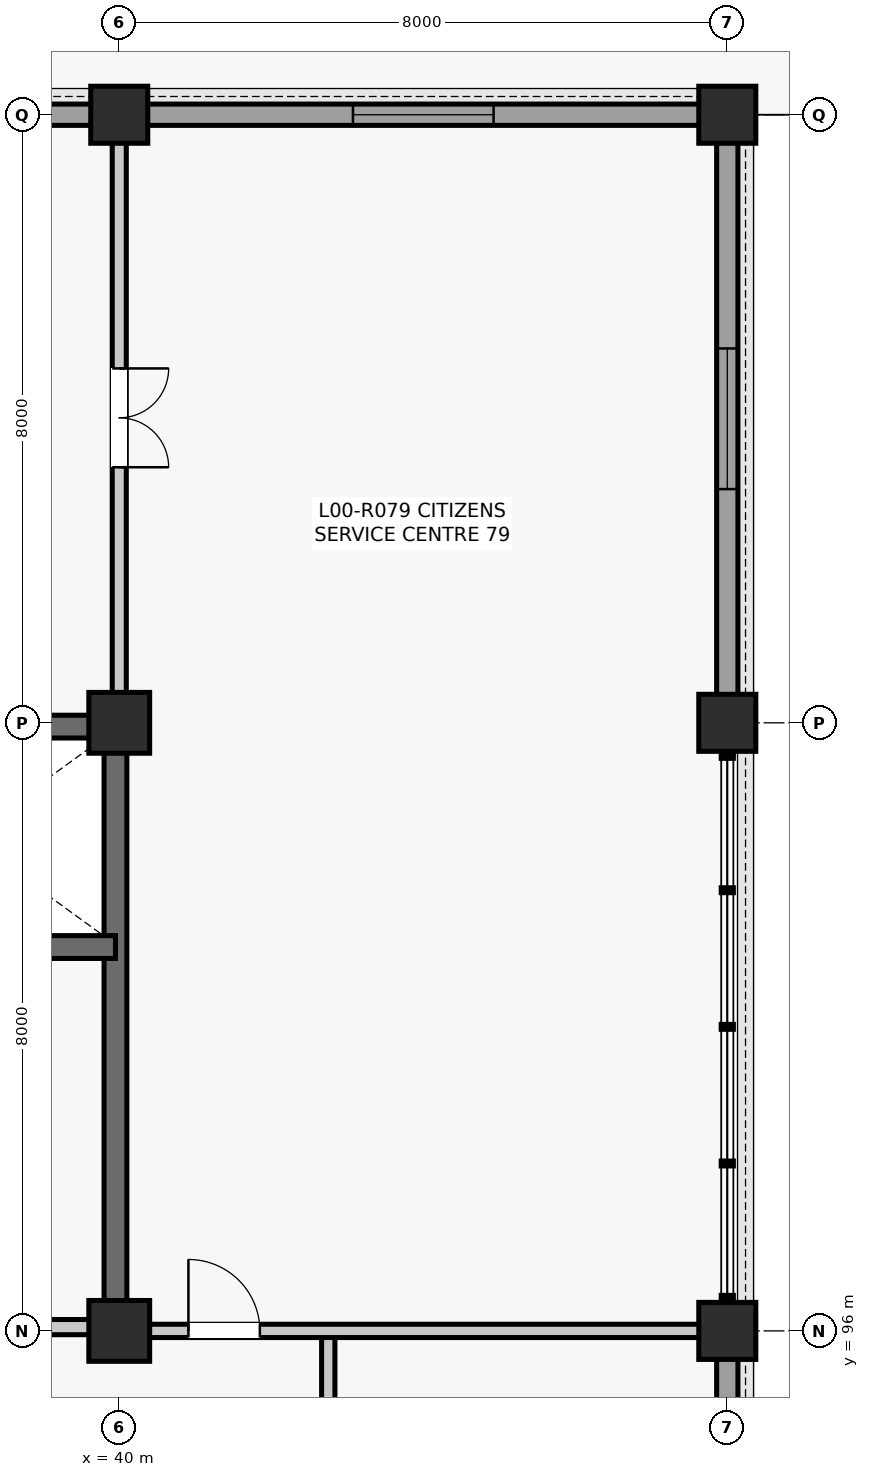
"""IFC4 building model, lengths in metres.
Left out: names, types, materials, properties, quantities, classifications, styles, units other than length and angle.
Written with IfcOpenShell. Run it as: python <this file> out.ifc"""

import sys

from ifc_helpers import new_model, si_unit, direction, frame, frame_2d, origin, origin_2d, place, context, subcontext, project, spatial, rectangle, extrude, element, fill, save


model = new_model("IFC4")
c1 = context("Model", 3, precision=1e-05, world=origin(), true_north=direction((0.0, 1.0)))
c2 = subcontext(c1, "Body", "Model", "MODEL_VIEW")
j1 = project(units=[si_unit("LENGTHUNIT", "METRE"), si_unit("PLANEANGLEUNIT", "RADIAN")], contexts=[c1])
p1 = place(None, origin())
s1 = spatial("IfcSite", under=j1, at=p1, CompositionType="ELEMENT")
p2 = place(p1, origin())
s2 = spatial("IfcBuilding", under=s1, at=p2, CompositionType="ELEMENT")
p3 = place(p2, origin())
s3 = spatial("IfcBuildingStorey", under=s2, at=p3, CompositionType="ELEMENT", Elevation=0.0)
for number, where, z_axis, x_axis in (
    (1, (40.0, 96.0, 0.0), (0.0, 0.0, 1.0), (1.0, 0.0, 0.0)),
    (2, (40.0, 104.0, 0.0), (0.0, 0.0, 1.0), (1.0, 0.0, 0.0)),
):
    element("IfcColumn", number, at=place(p3, frame(where, z_axis=z_axis, x_axis=x_axis)), inside=s3, PredefinedType="COLUMN", context=c2, shape_type="SweptSolid", body=[
        extrude(rectangle(XDim=0.8, YDim=0.8, at=origin_2d()), origin(), (0.0, 0.0, 1.0), 5.28),
    ])
for number, where, z_axis, x_axis in (
    (3, (40.0, 112.0, 0.0), (0.0, 0.0, 1.0), (1.0, 0.0, 0.0)),
    (4, (48.0, 96.0, 0.0), (0.0, 0.0, 1.0), (1.0, 0.0, 0.0)),
    (5, (48.0, 104.0, 0.0), (0.0, 0.0, 1.0), (1.0, 0.0, 0.0)),
    (6, (48.0, 112.0, 0.0), (0.0, 0.0, 1.0), (1.0, 0.0, 0.0)),
):
    element("IfcColumn", number, at=place(p3, frame(where, z_axis=z_axis, x_axis=x_axis)), inside=s3, PredefinedType="COLUMN", context=c2, shape_type="SweptSolid", body=[
        extrude(rectangle(XDim=0.75, YDim=0.75, at=origin_2d()), origin(), (0.0, 0.0, 1.0), 5.28),
    ])
p4 = place(p3, frame((32.36, 112.0, 0.0), z_axis=(0.0, 0.0, 1.0), x_axis=(1.0, 0.0, 0.0)))
e7 = element("IfcWall", 7, at=p4, inside=s3, PredefinedType="SOLIDWALL", context=c2, shape_type="SweptSolid", body=[
    extrude(rectangle(XDim=7.28, YDim=0.28, at=frame_2d((3.64, 0.0))), origin(), (0.0, 0.0, 1.0), 4.614),
])
p5 = place(p4, frame((2.54, 0.0, 0.0)))
e8 = element("IfcOpeningElement", 8, at=p5, cuts=e7, PredefinedType="OPENING", context=c2, shape_type="SweptSolid", body=[
    extrude(rectangle(XDim=2.2, YDim=2.5, at=frame_2d((1.1, 1.25))), frame((0.0, 0.15, 0.0), z_axis=(0.0, -1.0, 0.0), x_axis=(1.0, 0.0, 0.0)), (0.0, 0.0, 1.0), 0.3),
])
p6 = place(p3, frame((48.0, 88.36, 0.0), z_axis=(0.0, 0.0, 1.0), x_axis=(0.0, 1.0, 0.0)))
e9 = element("IfcWall", 9, at=p6, inside=s3, PredefinedType="SOLIDWALL", context=c2, shape_type="SweptSolid", body=[
    extrude(rectangle(XDim=7.28, YDim=0.28, at=frame_2d((3.64, 0.0))), origin(), (0.0, 0.0, 1.0), 4.674),
])
p7 = place(p6, frame((0.71, 0.0, 0.95)))
e10 = element("IfcOpeningElement", 10, at=p7, cuts=e9, PredefinedType="OPENING", context=c2, shape_type="SweptSolid", body=[
    extrude(rectangle(XDim=1.2, YDim=1.8, at=frame_2d((0.6, 0.9))), frame((0.0, 0.15, 0.0), z_axis=(0.0, -1.0, 0.0), x_axis=(1.0, 0.0, 0.0)), (0.0, 0.0, 1.0), 0.3),
])
p8 = place(p6, frame((5.37, 0.0, 0.95)))
e11 = element("IfcOpeningElement", 11, at=p8, cuts=e9, PredefinedType="OPENING", context=c2, shape_type="SweptSolid", body=[
    extrude(rectangle(XDim=1.2, YDim=1.8, at=frame_2d((0.6, 0.9))), frame((0.0, 0.15, 0.0), z_axis=(0.0, -1.0, 0.0), x_axis=(1.0, 0.0, 0.0)), (0.0, 0.0, 1.0), 0.3),
])
p9 = place(p3, frame((40.36, 112.0, 0.0), z_axis=(0.0, 0.0, 1.0), x_axis=(1.0, 0.0, 0.0)))
e12 = element("IfcWall", 12, at=p9, inside=s3, PredefinedType="SOLIDWALL", context=c2, shape_type="SweptSolid", body=[
    extrude(rectangle(XDim=7.28, YDim=0.28, at=frame_2d((3.64, 0.0))), origin(), (0.0, 0.0, 1.0), 4.677),
])
p10 = place(p9, frame((2.715, 0.0, 0.9)))
e13 = element("IfcOpeningElement", 13, at=p10, cuts=e12, PredefinedType="OPENING", context=c2, shape_type="SweptSolid", body=[
    extrude(rectangle(XDim=1.85, YDim=2.65, at=frame_2d((0.925, 1.325))), frame((0.0, 0.15, 0.0), z_axis=(0.0, -1.0, 0.0), x_axis=(1.0, 0.0, 0.0)), (0.0, 0.0, 1.0), 0.3),
])
p11 = place(p3, frame((48.0, 104.36, 0.0), z_axis=(0.0, 0.0, 1.0), x_axis=(0.0, 1.0, 0.0)))
e14 = element("IfcWall", 14, at=p11, inside=s3, PredefinedType="SOLIDWALL", context=c2, shape_type="SweptSolid", body=[
    extrude(rectangle(XDim=7.28, YDim=0.28, at=frame_2d((3.64, 0.0))), origin(), (0.0, 0.0, 1.0), 4.677),
])
p12 = place(p11, frame((2.715, 0.0, 0.9)))
e15 = element("IfcOpeningElement", 15, at=p12, cuts=e14, PredefinedType="OPENING", context=c2, shape_type="SweptSolid", body=[
    extrude(rectangle(XDim=1.85, YDim=2.65, at=frame_2d((0.925, 1.325))), frame((0.0, 0.15, 0.0), z_axis=(0.0, -1.0, 0.0), x_axis=(1.0, 0.0, 0.0)), (0.0, 0.0, 1.0), 0.3),
])
for number, where, z_axis, x_axis in (
    (16, (32.29, 103.95, 0.0), (0.0, 0.0, 1.0), (1.0, 0.0, 0.0)),
    (17, (39.95, 96.29, 0.0), (0.0, 0.0, 1.0), (0.0, 1.0, 0.0)),
):
    element("IfcWall", number, at=place(p3, frame(where, z_axis=z_axis, x_axis=x_axis)), inside=s3, PredefinedType="SHEAR", context=c2, shape_type="SweptSolid", body=[
        extrude(rectangle(XDim=7.42, YDim=0.3, at=frame_2d((3.71, 0.0))), origin(), (0.0, 0.0, 1.0), 5.035),
    ])
p13 = place(p3, frame((36.0, 101.05, 0.0), z_axis=(0.0, 0.0, 1.0), x_axis=(1.0, 0.0, 0.0)))
e18 = element("IfcWall", 18, at=p13, inside=s3, PredefinedType="SHEAR", context=c2, shape_type="SweptSolid", body=[
    extrude(rectangle(XDim=3.95, YDim=0.3, at=frame_2d((1.975, 0.0))), origin(), (0.0, 0.0, 1.0), 5.035),
])
p14 = place(p13, frame((1.425, 0.0, 0.0)))
e19 = element("IfcOpeningElement", 19, at=p14, cuts=e18, PredefinedType="OPENING", context=c2, shape_type="SweptSolid", body=[
    extrude(rectangle(XDim=1.1, YDim=2.2, at=frame_2d((0.55, 1.1))), frame((0.0, 0.16, 0.0), z_axis=(0.0, -1.0, 0.0), x_axis=(1.0, 0.0, 0.0)), (0.0, 0.0, 1.0), 0.32),
])
p15 = place(p3, frame((36.0, 96.05, 0.0), z_axis=(0.0, 0.0, 1.0), x_axis=(1.0, 0.0, 0.0)))
e20 = element("IfcWall", 20, at=p15, inside=s3, PredefinedType="PARTITIONING", context=c2, shape_type="SweptSolid", body=[
    extrude(rectangle(XDim=3.61, YDim=0.2, at=frame_2d((1.805, 0.0))), origin(), (0.0, 0.0, 1.0), 4.327),
])
p16 = place(p15, frame((1.205, 0.0, 0.0)))
e21 = element("IfcOpeningElement", 21, at=p16, cuts=e20, PredefinedType="OPENING", context=c2, shape_type="SweptSolid", body=[
    extrude(rectangle(XDim=1.2, YDim=2.15, at=frame_2d((0.6, 1.075))), frame((0.0, 0.11, 0.0), z_axis=(0.0, -1.0, 0.0), x_axis=(1.0, 0.0, 0.0)), (0.0, 0.0, 1.0), 0.22),
])
p17 = place(p3, frame((42.75, 90.7, 0.0), z_axis=(0.0, 0.0, 1.0), x_axis=(0.0, 1.0, 0.0)))
e22 = element("IfcWall", 22, at=p17, inside=s3, PredefinedType="PARTITIONING", context=c2, shape_type="SweptSolid", body=[
    extrude(rectangle(XDim=5.28, YDim=0.175, at=frame_2d((2.64, 0.0))), origin(), (0.0, 0.0, 1.0), 4.403),
])
p18 = place(p3, frame((40.0, 104.39, 0.0), z_axis=(0.0, 0.0, 1.0), x_axis=(0.0, 1.0, 0.0)))
e23 = element("IfcWall", 23, at=p18, inside=s3, PredefinedType="PARTITIONING", context=c2, shape_type="SweptSolid", body=[
    extrude(rectangle(XDim=7.245, YDim=0.185, at=frame_2d((3.623, 0.0))), origin(), (0.0, 0.0, 1.0), 4.404),
])
p19 = place(p18, frame((2.972, 0.0, 0.0)))
e24 = element("IfcOpeningElement", 24, at=p19, cuts=e23, PredefinedType="OPENING", context=c2, shape_type="SweptSolid", body=[
    extrude(rectangle(XDim=1.3, YDim=2.2, at=frame_2d((0.65, 1.1))), frame((0.0, 0.103, 0.0), z_axis=(0.0, -1.0, 0.0), x_axis=(1.0, 0.0, 0.0)), (0.0, 0.0, 1.0), 0.205),
])
p20 = place(p3, frame((40.39, 96.0, 0.0), z_axis=(0.0, 0.0, 1.0), x_axis=(1.0, 0.0, 0.0)))
e25 = element("IfcWall", 25, at=p20, inside=s3, PredefinedType="PARTITIONING", context=c2, shape_type="SweptSolid", body=[
    extrude(rectangle(XDim=7.245, YDim=0.175, at=frame_2d((3.623, 0.0))), origin(), (0.0, 0.0, 1.0), 4.403),
])
p21 = place(p20, frame((0.52, 0.0, 0.0)))
e26 = element("IfcOpeningElement", 26, at=p21, cuts=e25, PredefinedType="OPENING", context=c2, shape_type="SweptSolid", body=[
    extrude(rectangle(XDim=0.94, YDim=2.12, at=frame_2d((0.47, 1.06))), frame((0.0, 0.097, 0.0), z_axis=(0.0, -1.0, 0.0), x_axis=(1.0, 0.0, 0.0)), (0.0, 0.0, 1.0), 0.195),
])
p22 = place(p10, origin())
e27 = element("IfcWindow", 27, at=p22, inside=s3, PartitioningType="SINGLE_PANEL", PredefinedType="WINDOW", context=c2, shape_type="SweptSolid", body=[
    extrude(rectangle(XDim=1.85, YDim=2.65, at=frame_2d((0.925, 1.325))), frame((0.0, 0.03, 0.0), z_axis=(0.0, -1.0, 0.0), x_axis=(1.0, 0.0, 0.0)), (0.0, 0.0, 1.0), 0.06),
])
fill(e13, e27)
p23 = place(p12, origin())
e28 = element("IfcWindow", 28, at=p23, inside=s3, PartitioningType="SINGLE_PANEL", PredefinedType="WINDOW", context=c2, shape_type="SweptSolid", body=[
    extrude(rectangle(XDim=1.85, YDim=2.65, at=frame_2d((0.925, 1.325))), frame((0.0, 0.03, 0.0), z_axis=(0.0, -1.0, 0.0), x_axis=(1.0, 0.0, 0.0)), (0.0, 0.0, 1.0), 0.06),
])
fill(e15, e28)
p24 = place(p19, frame((1.3, 0.0, 0.0), z_axis=(0.0, 0.0, 1.0), x_axis=(-1.0, 0.0, 0.0)))
e29 = element("IfcDoor", 29, at=p24, inside=s3, OperationType="DOUBLE_DOOR_SINGLE_SWING", PredefinedType="DOOR", context=c2, shape_type="SweptSolid", body=[
    extrude(rectangle(XDim=1.3, YDim=2.2, at=frame_2d((0.65, 1.1))), frame((0.0, 0.025, 0.0), z_axis=(0.0, -1.0, 0.0), x_axis=(1.0, 0.0, 0.0)), (0.0, 0.0, 1.0), 0.05),
])
fill(e24, e29)
p25 = place(p21, origin())
e30 = element("IfcDoor", 30, at=p25, inside=s3, OperationType="SINGLE_SWING_LEFT", PredefinedType="DOOR", context=c2, shape_type="SweptSolid", body=[
    extrude(rectangle(XDim=0.94, YDim=2.12, at=frame_2d((0.47, 1.06))), frame((0.0, 0.025, 0.0), z_axis=(0.0, -1.0, 0.0), x_axis=(1.0, 0.0, 0.0)), (0.0, 0.0, 1.0), 0.05),
])
fill(e26, e30)
save(model, sys.argv[1])
